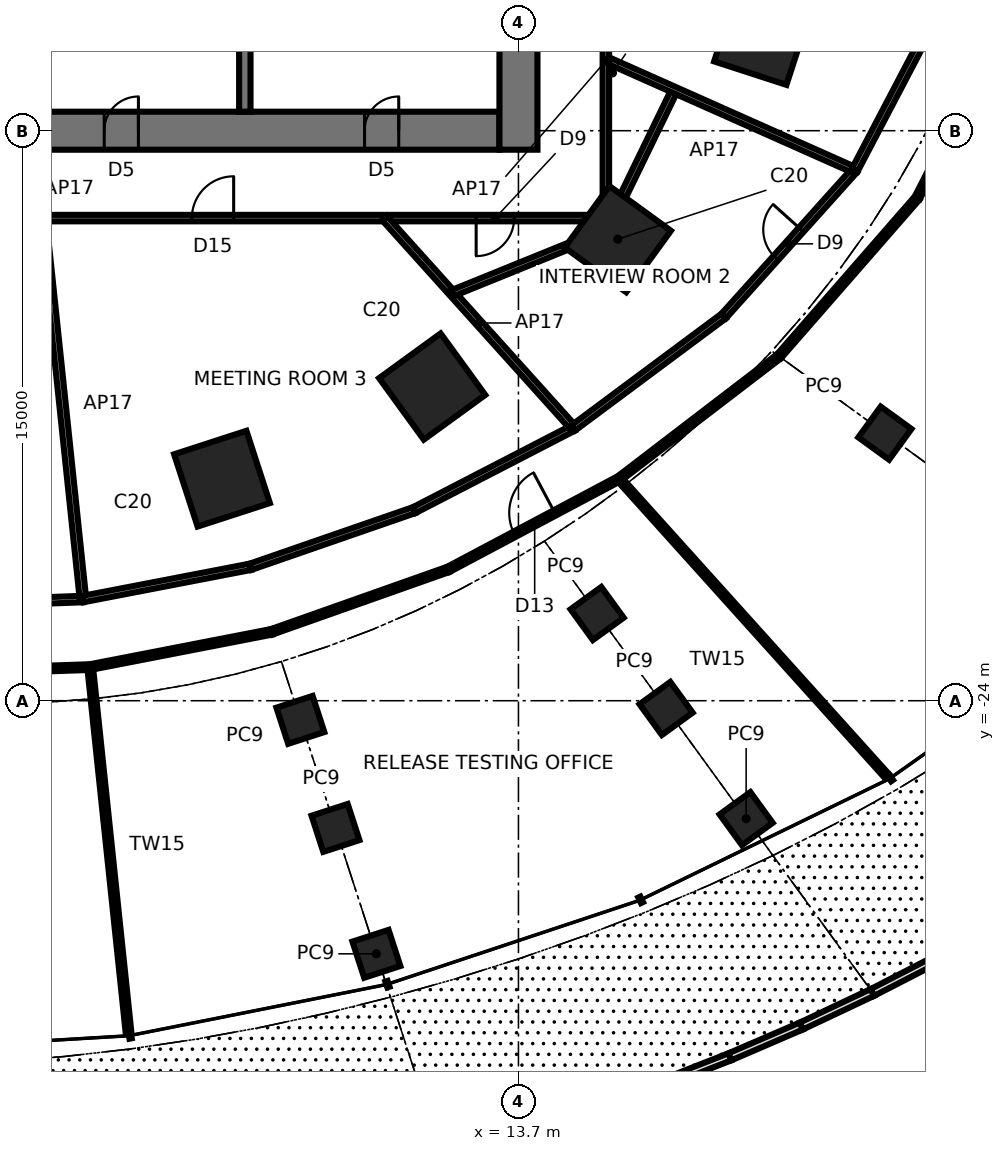
"""IFC4 building model, lengths in metres.
Left out: names, types, materials, properties, quantities, classifications, styles, units other than length and angle.
Written with IfcOpenShell. Run it as: python <this file> out.ifc"""

import sys

from ifc_helpers import new_model, si_unit, direction, frame, frame_2d, origin, origin_2d, place, context, subcontext, project, spatial, rectangle, extrude, element, fill, save


model = new_model("IFC4")
c1 = context("Model", 3, precision=1e-05, world=origin(), true_north=direction((0.0, 1.0)))
c2 = subcontext(c1, "Body", "Model", "MODEL_VIEW")
j1 = project(units=[si_unit("LENGTHUNIT", "METRE"), si_unit("PLANEANGLEUNIT", "RADIAN")], contexts=[c1])
p1 = place(None, origin())
s1 = spatial("IfcSite", under=j1, at=p1, CompositionType="ELEMENT")
p2 = place(p1, origin())
s2 = spatial("IfcBuilding", under=s1, at=p2, CompositionType="ELEMENT")
p3 = place(p2, frame((0.0, 0.0, 5.6)))
s3 = spatial("IfcBuildingStorey", under=s2, at=p3, CompositionType="ELEMENT", Elevation=5.6)
for number, where, z_axis, x_axis in (
    (1, (5.9, -18.157, 0.0), (0.0, 0.0, 1.0), (0.309, -0.951, 0.0)),
    (2, (11.43, -15.733, 0.0), (0.0, 0.0, 1.0), (0.588, -0.809, 0.0)),
    (3, (16.315, -11.854, 0.0), (0.0, 0.0, 1.0), (0.809, -0.588, 0.0)),
    (4, (20.109, -6.534, 0.0), (0.0, 0.0, 1.0), (0.951, -0.309, 0.0)),
):
    element("IfcColumn", number, at=place(p3, frame(where, z_axis=z_axis, x_axis=x_axis)), inside=s3, PredefinedType="COLUMN", context=c2, shape_type="SweptSolid", body=[
        extrude(rectangle(XDim=2.0, YDim=2.0, at=origin_2d()), origin(), (0.0, 0.0, 1.0), 5.0),
    ])
for number, where, z_axis, x_axis in (
    (5, (9.962, -30.66, 0.0), (0.0, 0.0, 1.0), (0.309, -0.951, 0.0)),
    (6, (19.692, -27.103, 0.0), (0.0, 0.0, 1.0), (0.588, -0.809, 0.0)),
    (7, (8.886, -27.347, 0.0), (0.0, 0.0, 1.0), (0.309, -0.951, 0.0)),
    (8, (17.585, -24.204, 0.0), (0.0, 0.0, 1.0), (0.588, -0.809, 0.0)),
    (9, (7.962, -24.504, 0.0), (0.0, 0.0, 1.0), (0.309, -0.951, 0.0)),
    (10, (15.77, -21.705, 0.0), (0.0, 0.0, 1.0), (0.588, -0.809, 0.0)),
    (11, (23.342, -16.959, 0.0), (0.0, 0.0, 1.0), (0.809, -0.588, 0.0)),
):
    element("IfcColumn", number, at=place(p3, frame(where, z_axis=z_axis, x_axis=x_axis)), inside=s3, PredefinedType="COLUMN", context=c2, shape_type="SweptSolid", body=[
        extrude(rectangle(XDim=1.0, YDim=1.0, at=origin_2d()), origin(), (0.0, 0.0, 1.0), 5.0),
    ])
p4 = place(p3, frame((-13.2, -9.0, 0.0), z_axis=(0.0, 0.0, 1.0), x_axis=(1.0, 0.0, 0.0)))
e12 = element("IfcWall", 12, at=p4, inside=s3, PredefinedType="SHEAR", context=c2, shape_type="SweptSolid", body=[
    extrude(rectangle(XDim=26.4, YDim=1.0, at=frame_2d((13.2, 0.0))), origin(), (0.0, 0.0, 1.0), 5.0),
])
p5 = place(p4, frame((0.2, 0.0, 0.0)))
e13 = element("IfcOpeningElement", 13, at=p5, cuts=e12, PredefinedType="OPENING", context=c2, shape_type="SweptSolid", body=[
    extrude(rectangle(XDim=1.0, YDim=2.1, at=frame_2d((0.5, 1.05))), frame((0.0, 0.51, 0.0), z_axis=(0.0, -1.0, 0.0), x_axis=(1.0, 0.0, 0.0)), (0.0, 0.0, 1.0), 1.02),
])
p6 = place(p4, frame((9.5, 0.0, 0.0)))
e14 = element("IfcOpeningElement", 14, at=p6, cuts=e12, PredefinedType="OPENING", context=c2, shape_type="SweptSolid", body=[
    extrude(rectangle(XDim=0.9, YDim=2.1, at=frame_2d((0.45, 1.05))), frame((0.0, 0.51, 0.0), z_axis=(0.0, -1.0, 0.0), x_axis=(1.0, 0.0, 0.0)), (0.0, 0.0, 1.0), 1.02),
])
p7 = place(p4, frame((16.0, 0.0, 0.0)))
e15 = element("IfcOpeningElement", 15, at=p7, cuts=e12, PredefinedType="OPENING", context=c2, shape_type="SweptSolid", body=[
    extrude(rectangle(XDim=0.9, YDim=2.1, at=frame_2d((0.45, 1.05))), frame((0.0, 0.51, 0.0), z_axis=(0.0, -1.0, 0.0), x_axis=(1.0, 0.0, 0.0)), (0.0, 0.0, 1.0), 1.02),
])
p8 = place(p4, frame((22.85, 0.0, 0.0)))
e16 = element("IfcOpeningElement", 16, at=p8, cuts=e12, PredefinedType="OPENING", context=c2, shape_type="SweptSolid", body=[
    extrude(rectangle(XDim=0.9, YDim=2.1, at=frame_2d((0.45, 1.05))), frame((0.0, 0.51, 0.0), z_axis=(0.0, -1.0, 0.0), x_axis=(1.0, 0.0, 0.0)), (0.0, 0.0, 1.0), 1.02),
])
p9 = place(p3, frame((13.7, -9.5, 0.0), z_axis=(0.0, 0.0, 1.0), x_axis=(0.0, 1.0, 0.0)))
e17 = element("IfcWall", 17, at=p9, inside=s3, PredefinedType="SHEAR", context=c2, shape_type="SweptSolid", body=[
    extrude(rectangle(XDim=19.0, YDim=1.0, at=frame_2d((9.5, 0.0))), origin(), (0.0, 0.0, 1.0), 5.0),
])
p10 = place(p9, frame((8.6, 0.0, 0.0)))
e18 = element("IfcOpeningElement", 18, at=p10, cuts=e17, PredefinedType="OPENING", context=c2, shape_type="SweptSolid", body=[
    extrude(rectangle(XDim=1.8, YDim=2.4, at=frame_2d((0.9, 1.2))), frame((0.0, 0.51, 0.0), z_axis=(0.0, -1.0, 0.0), x_axis=(1.0, 0.0, 0.0)), (0.0, 0.0, 1.0), 1.02),
])
p11 = place(p3, frame((6.5, -4.75, 0.0), z_axis=(0.0, 0.0, 1.0), x_axis=(0.0, -1.0, 0.0)))
e19 = element("IfcWall", 19, at=p11, inside=s3, PredefinedType="SHEAR", context=c2, shape_type="SweptSolid", body=[
    extrude(rectangle(XDim=3.75, YDim=0.3, at=frame_2d((1.875, 0.0))), origin(), (0.0, 0.0, 1.0), 5.0),
])
p12 = place(p3, frame((17.38, -34.11, 0.0), z_axis=(0.0, 0.0, 1.0), x_axis=(0.930940274783, 0.365171473129, 0.0)))
e20 = element("IfcWall", 20, at=p12, inside=s3, PredefinedType="PARAPET", context=c2, shape_type="SweptSolid", body=[
    extrude(rectangle(XDim=2.026, YDim=0.2, at=frame_2d((1.013, 0.0))), origin(), (0.0, 0.0, 1.0), 1.1),
])
p13 = place(p3, frame((19.266, -33.37, 0.0), z_axis=(0.0, 0.0, 1.0), x_axis=(0.918359236992, 0.395747788157, 0.0)))
e21 = element("IfcWall", 21, at=p13, inside=s3, PredefinedType="PARAPET", context=c2, shape_type="SweptSolid", body=[
    extrude(rectangle(XDim=2.046, YDim=0.2, at=frame_2d((1.023, 0.0))), origin(), (0.0, 0.0, 1.0), 1.1),
])
p14 = place(p3, frame((21.145, -32.56, 0.0), z_axis=(0.0, 0.0, 1.0), x_axis=(0.904170117636, 0.427172562759, 0.0)))
e22 = element("IfcWall", 22, at=p14, inside=s3, PredefinedType="PARAPET", context=c2, shape_type="SweptSolid", body=[
    extrude(rectangle(XDim=2.068, YDim=0.2, at=frame_2d((1.034, 0.0))), origin(), (0.0, 0.0, 1.0), 1.1),
])
p15 = place(p3, frame((23.014, -31.677, 0.0), z_axis=(0.0, 0.0, 1.0), x_axis=(0.88915717115, 0.457601928528, 0.0)))
e23 = element("IfcWall", 23, at=p15, inside=s3, PredefinedType="PARAPET", context=c2, shape_type="SweptSolid", body=[
    extrude(rectangle(XDim=1.846, YDim=0.2, at=frame_2d((0.923, 0.0))), origin(), (0.0, 0.0, 1.0), 1.1),
])
p16 = place(p3, frame((2.241, -21.325, 0.0), z_axis=(0.0, 0.0, 1.0), x_axis=(-0.999316169957, -0.03697556575, 0.0)))
e24 = element("IfcWall", 24, at=p16, inside=s3, PredefinedType="PARTITIONING", context=c2, shape_type="SweptSolid", body=[
    extrude(rectangle(XDim=4.503, YDim=0.17, at=frame_2d((2.251, 0.0))), origin(), (0.0, 0.0, 1.0), 4.8),
])
p17 = place(p16, frame((1.752, 0.0, 0.0)))
e25 = element("IfcOpeningElement", 25, at=p17, cuts=e24, PredefinedType="OPENING", context=c2, shape_type="SweptSolid", body=[
    extrude(rectangle(XDim=1.0, YDim=2.4, at=frame_2d((0.5, 1.2))), frame((0.0, 0.095, 0.0), z_axis=(0.0, -1.0, 0.0), x_axis=(1.0, 0.0, 0.0)), (0.0, 0.0, 1.0), 0.19),
])
p18 = place(p3, frame((-2.447, -23.281, 0.0), z_axis=(0.0, 0.0, 1.0), x_axis=(0.999419294802, 0.034074523869, 0.0)))
e26 = element("IfcWall", 26, at=p18, inside=s3, PredefinedType="PARTITIONING", context=c2, shape_type="SweptSolid", body=[
    extrude(rectangle(XDim=4.879, YDim=0.15, at=frame_2d((2.44, 0.0))), origin(), (0.0, 0.0, 1.0), 4.8),
])
p19 = place(p3, frame((1.188, -11.3, 0.0), z_axis=(0.0, 0.0, 1.0), x_axis=(0.104512053293, -0.994523619989, 0.0)))
e27 = element("IfcWall", 27, at=p19, inside=s3, PredefinedType="PARTITIONING", context=c2, shape_type="SweptSolid", body=[
    extrude(rectangle(XDim=10.08, YDim=0.17, at=frame_2d((5.04, 0.0))), origin(), (0.0, 0.0, 1.0), 4.8),
])
p20 = place(p3, frame((2.429, -23.115, 0.0), z_axis=(0.0, 0.0, 1.0), x_axis=(0.104544233856, -0.994520237686, 0.0)))
e28 = element("IfcWall", 28, at=p20, inside=s3, PredefinedType="PARTITIONING", context=c2, shape_type="SweptSolid", body=[
    extrude(rectangle(XDim=9.675, YDim=0.15, at=frame_2d((4.837, 0.0))), origin(), (0.0, 0.0, 1.0), 4.8),
])
p21 = place(p3, frame((2.429, -23.115, 0.0), z_axis=(0.0, 0.0, 1.0), x_axis=(0.981647737098, 0.190703225592, 0.0)))
e29 = element("IfcWall", 29, at=p21, inside=s3, PredefinedType="PARTITIONING", context=c2, shape_type="SweptSolid", body=[
    extrude(rectangle(XDim=4.869, YDim=0.15, at=frame_2d((2.434, 0.0))), origin(), (0.0, 0.0, 1.0), 4.8),
])
p22 = place(p3, frame((6.653, -20.475, 0.0), z_axis=(0.0, 0.0, 1.0), x_axis=(-0.981933890717, -0.189224296169, 0.0)))
e30 = element("IfcWall", 30, at=p22, inside=s3, PredefinedType="PARTITIONING", context=c2, shape_type="SweptSolid", body=[
    extrude(rectangle(XDim=4.492, YDim=0.17, at=frame_2d((2.246, 0.0))), origin(), (0.0, 0.0, 1.0), 4.8),
])
p23 = place(p3, frame((7.209, -22.187, 0.0), z_axis=(0.0, 0.0, 1.0), x_axis=(0.94280197492, 0.333353320197, 0.0)))
e31 = element("IfcWall", 31, at=p23, inside=s3, PredefinedType="PARTITIONING", context=c2, shape_type="SweptSolid", body=[
    extrude(rectangle(XDim=4.933, YDim=0.15, at=frame_2d((2.467, 0.0))), origin(), (0.0, 0.0, 1.0), 4.8),
])
p24 = place(p3, frame((10.96, -18.983, 0.0), z_axis=(0.0, 0.0, 1.0), x_axis=(-0.944956141071, -0.327197022377, 0.0)))
e32 = element("IfcWall", 32, at=p24, inside=s3, PredefinedType="PARTITIONING", context=c2, shape_type="SweptSolid", body=[
    extrude(rectangle(XDim=4.558, YDim=0.17, at=frame_2d((2.279, 0.0))), origin(), (0.0, 0.0, 1.0), 4.8),
])
p25 = place(p3, frame((-1.188, -11.3, 0.0), z_axis=(0.0, 0.0, 1.0), x_axis=(1.0, 0.0, 0.0)))
e33 = element("IfcWall", 33, at=p25, inside=s3, PredefinedType="PARTITIONING", context=c2, shape_type="SweptSolid", body=[
    extrude(rectangle(XDim=17.188, YDim=0.17, at=frame_2d((8.594, 0.0))), origin(), (0.0, 0.0, 1.0), 4.8),
])
p26 = place(p25, frame((6.294, 0.0, 0.0)))
e34 = element("IfcOpeningElement", 34, at=p26, cuts=e33, PredefinedType="OPENING", context=c2, shape_type="SweptSolid", body=[
    extrude(rectangle(XDim=1.1, YDim=2.4, at=frame_2d((0.55, 1.2))), frame((0.0, 0.095, 0.0), z_axis=(0.0, -1.0, 0.0), x_axis=(1.0, 0.0, 0.0)), (0.0, 0.0, 1.0), 0.19),
])
p27 = place(p25, frame((13.775, 0.0, 0.0)))
e35 = element("IfcOpeningElement", 35, at=p27, cuts=e33, PredefinedType="OPENING", context=c2, shape_type="SweptSolid", body=[
    extrude(rectangle(XDim=1.0, YDim=2.4, at=frame_2d((0.5, 1.2))), frame((0.0, 0.095, 0.0), z_axis=(0.0, -1.0, 0.0), x_axis=(1.0, 0.0, 0.0)), (0.0, 0.0, 1.0), 0.19),
])
p28 = place(p3, frame((11.86, -20.542, 0.0), z_axis=(0.0, 0.0, 1.0), x_axis=(0.883167950269, 0.469056895928, 0.0)))
e36 = element("IfcWall", 36, at=p28, inside=s3, PredefinedType="PARTITIONING", context=c2, shape_type="SweptSolid", body=[
    extrude(rectangle(XDim=5.083, YDim=0.15, at=frame_2d((2.542, 0.0))), origin(), (0.0, 0.0, 1.0), 4.8),
])
p29 = place(p28, frame((1.967, 0.0, 0.0)))
e37 = element("IfcOpeningElement", 37, at=p29, cuts=e36, PredefinedType="OPENING", context=c2, shape_type="SweptSolid", body=[
    extrude(rectangle(XDim=1.2, YDim=2.4, at=frame_2d((0.6, 1.2))), frame((0.0, 0.085, 0.0), z_axis=(0.0, -1.0, 0.0), x_axis=(1.0, 0.0, 0.0)), (0.0, 0.0, 1.0), 0.17),
])
p30 = place(p3, frame((15.145, -16.82, 0.0), z_axis=(0.0, 0.0, 1.0), x_axis=(-0.888324088064, -0.459217066935, 0.0)))
e38 = element("IfcWall", 38, at=p30, inside=s3, PredefinedType="PARTITIONING", context=c2, shape_type="SweptSolid", body=[
    extrude(rectangle(XDim=4.711, YDim=0.17, at=frame_2d((2.355, 0.0))), origin(), (0.0, 0.0, 1.0), 4.8),
])
p31 = place(p3, frame((23.406, -25.995, 0.0), z_axis=(0.0, 0.0, 1.0), x_axis=(-0.669133538754, 0.743142185126, 0.0)))
e39 = element("IfcWall", 39, at=p31, inside=s3, PredefinedType="PARTITIONING", context=c2, shape_type="SweptSolid", body=[
    extrude(rectangle(XDim=10.546, YDim=0.15, at=frame_2d((5.273, 0.0))), origin(), (0.0, 0.0, 1.0), 4.8),
])
p32 = place(p3, frame((10.175, -11.3, 0.0), z_axis=(0.0, 0.0, 1.0), x_axis=(0.669144492072, -0.74313232249, 0.0)))
e40 = element("IfcWall", 40, at=p32, inside=s3, PredefinedType="PARTITIONING", context=c2, shape_type="SweptSolid", body=[
    extrude(rectangle(XDim=7.428, YDim=0.17, at=frame_2d((3.714, 0.0))), origin(), (0.0, 0.0, 1.0), 4.8),
])
p33 = place(p3, frame((16.349, -18.158, 0.0), z_axis=(0.0, 0.0, 1.0), x_axis=(0.793951005075, 0.607981744414, 0.0)))
e41 = element("IfcWall", 41, at=p33, inside=s3, PredefinedType="PARTITIONING", context=c2, shape_type="SweptSolid", body=[
    extrude(rectangle(XDim=5.3, YDim=0.15, at=frame_2d((2.65, 0.0))), origin(), (0.0, 0.0, 1.0), 4.8),
])
p34 = place(p3, frame((19.101, -13.877, 0.0), z_axis=(0.0, 0.0, 1.0), x_axis=(-0.802376605187, -0.596818048862, 0.0)))
e42 = element("IfcWall", 42, at=p34, inside=s3, PredefinedType="PARTITIONING", context=c2, shape_type="SweptSolid", body=[
    extrude(rectangle(XDim=4.93, YDim=0.17, at=frame_2d((2.465, 0.0))), origin(), (0.0, 0.0, 1.0), 4.8),
])
p35 = place(p3, frame((16.01, -11.632, 0.0), z_axis=(0.0, 0.0, 1.0), x_axis=(-0.926462321179, -0.376387522955, 0.0)))
e43 = element("IfcWall", 43, at=p35, inside=s3, PredefinedType="PARTITIONING", context=c2, shape_type="SweptSolid", body=[
    extrude(rectangle(XDim=4.376, YDim=0.17, at=frame_2d((2.188, 0.0))), origin(), (0.0, 0.0, 1.0), 4.8),
])
p36 = place(p3, frame((17.808, -7.929, 0.0), z_axis=(0.0, 0.0, 1.0), x_axis=(-0.436602321688, -0.899654607445, 0.0)))
e44 = element("IfcWall", 44, at=p36, inside=s3, PredefinedType="PARTITIONING", context=c2, shape_type="SweptSolid", body=[
    extrude(rectangle(XDim=4.117, YDim=0.17, at=frame_2d((2.058, 0.0))), origin(), (0.0, 0.0, 1.0), 4.8),
])
p37 = place(p3, frame((20.557, -14.936, 0.0), z_axis=(0.0, 0.0, 1.0), x_axis=(0.657584842261, 0.753380498307, 0.0)))
e45 = element("IfcWall", 45, at=p37, inside=s3, PredefinedType="PARTITIONING", context=c2, shape_type="SweptSolid", body=[
    extrude(rectangle(XDim=5.528, YDim=0.15, at=frame_2d((2.764, 0.0))), origin(), (0.0, 0.0, 1.0), 4.8),
])
p38 = place(p3, frame((22.548, -10.039, 0.0), z_axis=(0.0, 0.0, 1.0), x_axis=(-0.668135531852, -0.744039589724, 0.0)))
e46 = element("IfcWall", 46, at=p38, inside=s3, PredefinedType="PARTITIONING", context=c2, shape_type="SweptSolid", body=[
    extrude(rectangle(XDim=5.159, YDim=0.17, at=frame_2d((2.58, 0.0))), origin(), (0.0, 0.0, 1.0), 4.8),
])
p39 = place(p38, frame((2.105, 0.0, 0.0)))
e47 = element("IfcOpeningElement", 47, at=p39, cuts=e46, PredefinedType="OPENING", context=c2, shape_type="SweptSolid", body=[
    extrude(rectangle(XDim=1.0, YDim=2.4, at=frame_2d((0.5, 1.2))), frame((0.0, 0.095, 0.0), z_axis=(0.0, -1.0, 0.0), x_axis=(1.0, 0.0, 0.0)), (0.0, 0.0, 1.0), 0.19),
])
p40 = place(p3, frame((22.548, -10.039, 0.0), z_axis=(0.0, 0.0, 1.0), x_axis=(-0.913552901279, 0.406719923982, 0.0)))
e48 = element("IfcWall", 48, at=p40, inside=s3, PredefinedType="PARTITIONING", context=c2, shape_type="SweptSolid", body=[
    extrude(rectangle(XDim=7.167, YDim=0.17, at=frame_2d((3.583, 0.0))), origin(), (0.0, 0.0, 1.0), 4.8),
])
p41 = place(p3, frame((24.192, -10.771, 0.0), z_axis=(0.0, 0.0, 1.0), x_axis=(0.454462020031, 0.890766115402, 0.0)))
e49 = element("IfcWall", 49, at=p41, inside=s3, PredefinedType="PARTITIONING", context=c2, shape_type="SweptSolid", body=[
    extrude(rectangle(XDim=5.701, YDim=0.15, at=frame_2d((2.851, 0.0))), origin(), (0.0, 0.0, 1.0), 4.8),
])
p42 = place(p3, frame((25.022, -5.319, 0.0), z_axis=(0.0, 0.0, 1.0), x_axis=(-0.464318498757, -0.885668296662, 0.0)))
e50 = element("IfcWall", 50, at=p42, inside=s3, PredefinedType="PARTITIONING", context=c2, shape_type="SweptSolid", body=[
    extrude(rectangle(XDim=5.33, YDim=0.17, at=frame_2d((2.665, 0.0))), origin(), (0.0, 0.0, 1.0), 4.8),
])
p43 = place(p3, frame((16.0, -11.3, 0.0), z_axis=(0.0, 0.0, 1.0), x_axis=(0.0, 1.0, 0.0)))
e51 = element("IfcWall", 51, at=p43, inside=s3, PredefinedType="PARTITIONING", context=c2, shape_type="SweptSolid", body=[
    extrude(rectangle(XDim=13.781, YDim=0.17, at=frame_2d((6.89, 0.0))), origin(), (0.0, 0.0, 1.0), 4.8),
])
p44 = place(p43, frame((8.429, 0.0, 0.0)))
e52 = element("IfcOpeningElement", 52, at=p44, cuts=e51, PredefinedType="OPENING", context=c2, shape_type="SweptSolid", body=[
    extrude(rectangle(XDim=1.1, YDim=2.4, at=frame_2d((0.55, 1.2))), frame((0.0, 0.095, 0.0), z_axis=(0.0, -1.0, 0.0), x_axis=(1.0, 0.0, 0.0)), (0.0, 0.0, 1.0), 0.19),
])
p45 = place(p7, origin())
e53 = element("IfcDoor", 53, at=p45, inside=s3, OperationType="SINGLE_SWING_RIGHT", PredefinedType="DOOR", context=c2, shape_type="SweptSolid", body=[
    extrude(rectangle(XDim=0.82, YDim=2.06, at=frame_2d((0.45, 1.03))), frame((0.0, 0.025, 0.0), z_axis=(0.0, -1.0, 0.0), x_axis=(1.0, 0.0, 0.0)), (0.0, 0.0, 1.0), 0.05),
    extrude(rectangle(XDim=0.04, YDim=2.1, at=frame_2d((0.02, 1.05))), frame((0.0, 0.25, 0.0), z_axis=(0.0, -1.0, 0.0), x_axis=(1.0, 0.0, 0.0)), (0.0, 0.0, 1.0), 0.5),
    extrude(rectangle(XDim=0.04, YDim=2.1, at=frame_2d((0.88, 1.05))), frame((0.0, 0.25, 0.0), z_axis=(0.0, -1.0, 0.0), x_axis=(1.0, 0.0, 0.0)), (0.0, 0.0, 1.0), 0.5),
    extrude(rectangle(XDim=0.82, YDim=0.04, at=frame_2d((0.45, 2.08))), frame((0.0, 0.25, 0.0), z_axis=(0.0, -1.0, 0.0), x_axis=(1.0, 0.0, 0.0)), (0.0, 0.0, 1.0), 0.5),
])
fill(e15, e53)
p46 = place(p8, origin())
e54 = element("IfcDoor", 54, at=p46, inside=s3, OperationType="SINGLE_SWING_RIGHT", PredefinedType="DOOR", context=c2, shape_type="SweptSolid", body=[
    extrude(rectangle(XDim=0.82, YDim=2.06, at=frame_2d((0.45, 1.03))), frame((0.0, 0.025, 0.0), z_axis=(0.0, -1.0, 0.0), x_axis=(1.0, 0.0, 0.0)), (0.0, 0.0, 1.0), 0.05),
    extrude(rectangle(XDim=0.04, YDim=2.1, at=frame_2d((0.02, 1.05))), frame((0.0, 0.25, 0.0), z_axis=(0.0, -1.0, 0.0), x_axis=(1.0, 0.0, 0.0)), (0.0, 0.0, 1.0), 0.5),
    extrude(rectangle(XDim=0.04, YDim=2.1, at=frame_2d((0.88, 1.05))), frame((0.0, 0.25, 0.0), z_axis=(0.0, -1.0, 0.0), x_axis=(1.0, 0.0, 0.0)), (0.0, 0.0, 1.0), 0.5),
    extrude(rectangle(XDim=0.82, YDim=0.04, at=frame_2d((0.45, 2.08))), frame((0.0, 0.25, 0.0), z_axis=(0.0, -1.0, 0.0), x_axis=(1.0, 0.0, 0.0)), (0.0, 0.0, 1.0), 0.5),
])
fill(e16, e54)
p47 = place(p26, origin())
e55 = element("IfcDoor", 55, at=p47, inside=s3, OperationType="SINGLE_SWING_RIGHT", PredefinedType="DOOR", context=c2, shape_type="SweptSolid", body=[
    extrude(rectangle(XDim=1.1, YDim=2.4, at=frame_2d((0.55, 1.2))), frame((0.0, 0.025, 0.0), z_axis=(0.0, -1.0, 0.0), x_axis=(1.0, 0.0, 0.0)), (0.0, 0.0, 1.0), 0.05),
])
fill(e34, e55)
p48 = place(p27, frame((1.0, 0.0, 0.0), z_axis=(0.0, 0.0, 1.0), x_axis=(-1.0, 0.0, 0.0)))
e56 = element("IfcDoor", 56, at=p48, inside=s3, OperationType="SINGLE_SWING_RIGHT", PredefinedType="DOOR", context=c2, shape_type="SweptSolid", body=[
    extrude(rectangle(XDim=1.0, YDim=2.4, at=frame_2d((0.5, 1.2))), frame((0.0, 0.025, 0.0), z_axis=(0.0, -1.0, 0.0), x_axis=(1.0, 0.0, 0.0)), (0.0, 0.0, 1.0), 0.05),
])
fill(e35, e56)
p49 = place(p39, frame((1.0, 0.0, 0.0), z_axis=(0.0, 0.0, 1.0), x_axis=(-1.0, 0.0, 0.0)))
e57 = element("IfcDoor", 57, at=p49, inside=s3, OperationType="SINGLE_SWING_RIGHT", PredefinedType="DOOR", context=c2, shape_type="SweptSolid", body=[
    extrude(rectangle(XDim=1.0, YDim=2.4, at=frame_2d((0.5, 1.2))), frame((0.0, 0.025, 0.0), z_axis=(0.0, -1.0, 0.0), x_axis=(1.0, 0.0, 0.0)), (0.0, 0.0, 1.0), 0.05),
])
fill(e47, e57)
p50 = place(p29, origin())
e58 = element("IfcDoor", 58, at=p50, inside=s3, OperationType="SINGLE_SWING_RIGHT", PredefinedType="DOOR", context=c2, shape_type="SweptSolid", body=[
    extrude(rectangle(XDim=1.2, YDim=2.4, at=frame_2d((0.6, 1.2))), frame((0.0, 0.025, 0.0), z_axis=(0.0, -1.0, 0.0), x_axis=(1.0, 0.0, 0.0)), (0.0, 0.0, 1.0), 0.05),
])
fill(e37, e58)
save(model, sys.argv[1])
